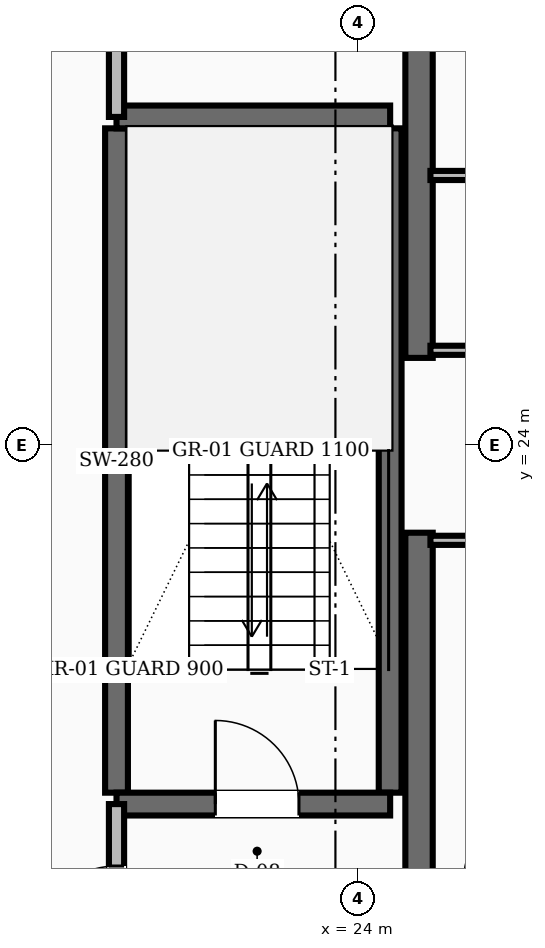
"""IFC4 building model, lengths in metres.
Left out: names, types, materials, properties, quantities, classifications, styles, units other than length and angle.
Written with IfcOpenShell. Run it as: python <this file> out.ifc"""

import sys

from ifc_helpers import new_model, si_unit, direction, frame, frame_2d, origin, place, context, subcontext, project, spatial, rectangle, extrude, element, fill, save


model = new_model("IFC4")
c1 = context("Model", 3, precision=1e-05, world=origin(), true_north=direction((0.0, 1.0)))
c2 = subcontext(c1, "Body", "Model", "MODEL_VIEW")
j1 = project(units=[si_unit("LENGTHUNIT", "METRE"), si_unit("PLANEANGLEUNIT", "RADIAN")], contexts=[c1])
p1 = place(None, origin())
s1 = spatial("IfcSite", under=j1, at=p1, CompositionType="ELEMENT")
p2 = place(p1, origin())
s2 = spatial("IfcBuilding", under=s1, at=p2, CompositionType="ELEMENT")
p3 = place(p2, frame((0.0, 0.0, 149.6)))
s3 = spatial("IfcBuildingStorey", under=s2, at=p3, CompositionType="ELEMENT", Elevation=149.6)
for number, where, z_axis, x_axis in (
    (1, (24.8, 16.55, 0.0), (0.0, 0.0, 1.0), (0.0, 1.0, 0.0)),
    (2, (24.8, 25.15, 0.0), (0.0, 0.0, 1.0), (0.0, 1.0, 0.0)),
):
    element("IfcWall", number, at=place(p3, frame(where, z_axis=z_axis, x_axis=x_axis)), inside=s3, PredefinedType="SHEAR", context=c2, shape_type="SweptSolid", body=[
        extrude(rectangle(XDim=6.3, YDim=0.36, at=frame_2d((3.15, 0.0))), origin(), (0.0, 0.0, 1.0), 3.6),
    ])
for number, where, z_axis, x_axis in (
    (3, (20.82, 19.43, 0.0), (0.0, 0.0, 1.0), (0.0, 1.0, 0.0)),
    (4, (24.42, 19.43, 0.0), (0.0, 0.0, 1.0), (0.0, 1.0, 0.0)),
):
    element("IfcWall", number, at=place(p3, frame(where, z_axis=z_axis, x_axis=x_axis)), inside=s3, PredefinedType="SHEAR", context=c2, shape_type="SweptSolid", body=[
        extrude(rectangle(XDim=8.74, YDim=0.3, at=frame_2d((4.37, 0.0))), origin(), (0.0, 0.0, 1.0), 3.6),
    ])
p4 = place(p3, frame((20.82, 19.28, 0.0), z_axis=(0.0, 0.0, 1.0), x_axis=(1.0, 0.0, 0.0)))
e5 = element("IfcWall", 5, at=p4, inside=s3, PredefinedType="SHEAR", context=c2, shape_type="SweptSolid", body=[
    extrude(rectangle(XDim=3.6, YDim=0.3, at=frame_2d((1.8, 0.0))), origin(), (0.0, 0.0, 1.0), 3.6),
])
p5 = place(p4, frame((1.3, 0.0, 0.0)))
e6 = element("IfcOpeningElement", 6, at=p5, cuts=e5, PredefinedType="OPENING", context=c2, shape_type="SweptSolid", body=[
    extrude(rectangle(XDim=1.1, YDim=2.1, at=frame_2d((0.55, 1.05))), frame((0.0, 0.16, 0.0), z_axis=(0.0, -1.0, 0.0), x_axis=(1.0, 0.0, 0.0)), (0.0, 0.0, 1.0), 0.32),
])
p6 = place(p3, frame((20.82, 28.32, 0.0), z_axis=(0.0, 0.0, 1.0), x_axis=(1.0, 0.0, 0.0)))
e7 = element("IfcWall", 7, at=p6, inside=s3, PredefinedType="SHEAR", context=c2, shape_type="SweptSolid", body=[
    extrude(rectangle(XDim=3.6, YDim=0.3, at=frame_2d((1.8, 0.0))), origin(), (0.0, 0.0, 1.0), 3.6),
])
p7 = place(p3, frame((20.82, 16.55, 0.0), z_axis=(0.0, 0.0, 1.0), x_axis=(0.0, 1.0, 0.0)))
e8 = element("IfcWall", 8, at=p7, inside=s3, PredefinedType="SOLIDWALL", context=c2, shape_type="SweptSolid", body=[
    extrude(rectangle(XDim=2.73, YDim=0.2, at=frame_2d((1.365, 0.0))), origin(), (0.0, 0.0, 1.0), 2.8),
])
p8 = place(p7, frame((0.815, 0.0, 0.0)))
e9 = element("IfcOpeningElement", 9, at=p8, cuts=e8, PredefinedType="OPENING", context=c2, shape_type="SweptSolid", body=[
    extrude(rectangle(XDim=1.1, YDim=2.1, at=frame_2d((0.55, 1.05))), frame((0.0, 0.11, 0.0), z_axis=(0.0, -1.0, 0.0), x_axis=(1.0, 0.0, 0.0)), (0.0, 0.0, 1.0), 0.22),
])
p9 = place(p3, frame((20.82, 28.32, 0.0), z_axis=(0.0, 0.0, 1.0), x_axis=(0.0, 1.0, 0.0)))
e10 = element("IfcWall", 10, at=p9, inside=s3, PredefinedType="SOLIDWALL", context=c2, shape_type="SweptSolid", body=[
    extrude(rectangle(XDim=3.13, YDim=0.2, at=frame_2d((1.565, 0.0))), origin(), (0.0, 0.0, 1.0), 2.8),
])
p10 = place(p9, frame((1.09, 0.0, 0.0)))
e11 = element("IfcOpeningElement", 11, at=p10, cuts=e10, PredefinedType="OPENING", context=c2, shape_type="SweptSolid", body=[
    extrude(rectangle(XDim=0.95, YDim=2.1, at=frame_2d((0.475, 1.05))), frame((0.0, 0.11, 0.0), z_axis=(0.0, -1.0, 0.0), x_axis=(1.0, 0.0, 0.0)), (0.0, 0.0, 1.0), 0.22),
])
p11 = place(p3, frame((24.95, 25.25, 0.0), z_axis=(0.0, 0.0, 1.0), x_axis=(1.0, 0.0, 0.0)))
e12 = element("IfcWall", 12, at=p11, inside=s3, PredefinedType="PARTITIONING", context=c2, shape_type="SweptSolid", body=[
    extrude(rectangle(XDim=3.2, YDim=0.12, at=frame_2d((1.6, 0.0))), origin(), (0.0, 0.0, 1.0), 2.8),
])
p12 = place(p11, frame((1.125, 0.0, 0.0)))
e13 = element("IfcOpeningElement", 13, at=p12, cuts=e12, PredefinedType="OPENING", context=c2, shape_type="SweptSolid", body=[
    extrude(rectangle(XDim=0.95, YDim=2.1, at=frame_2d((0.475, 1.05))), frame((0.0, 0.07, 0.0), z_axis=(0.0, -1.0, 0.0), x_axis=(1.0, 0.0, 0.0)), (0.0, 0.0, 1.0), 0.14),
])
p13 = place(p3, frame((24.95, 22.75, 0.0), z_axis=(0.0, 0.0, 1.0), x_axis=(1.0, 0.0, 0.0)))
e14 = element("IfcWall", 14, at=p13, inside=s3, PredefinedType="PARTITIONING", context=c2, shape_type="SweptSolid", body=[
    extrude(rectangle(XDim=3.2, YDim=0.12, at=frame_2d((1.6, 0.0))), origin(), (0.0, 0.0, 1.0), 2.8),
])
p14 = place(p13, frame((1.125, 0.0, 0.0)))
e15 = element("IfcOpeningElement", 15, at=p14, cuts=e14, PredefinedType="OPENING", context=c2, shape_type="SweptSolid", body=[
    extrude(rectangle(XDim=0.95, YDim=2.1, at=frame_2d((0.475, 1.05))), frame((0.0, 0.07, 0.0), z_axis=(0.0, -1.0, 0.0), x_axis=(1.0, 0.0, 0.0)), (0.0, 0.0, 1.0), 0.14),
])
p15 = place(p3, frame((24.95, 27.55, 0.0), z_axis=(0.0, 0.0, 1.0), x_axis=(1.0, 0.0, 0.0)))
e16 = element("IfcWall", 16, at=p15, inside=s3, PredefinedType="PARTITIONING", context=c2, shape_type="SweptSolid", body=[
    extrude(rectangle(XDim=3.2, YDim=0.12, at=frame_2d((1.6, 0.0))), origin(), (0.0, 0.0, 1.0), 2.8),
])
p16 = place(p15, frame((1.125, 0.0, 0.0)))
e17 = element("IfcOpeningElement", 17, at=p16, cuts=e16, PredefinedType="OPENING", context=c2, shape_type="SweptSolid", body=[
    extrude(rectangle(XDim=0.95, YDim=2.1, at=frame_2d((0.475, 1.05))), frame((0.0, 0.07, 0.0), z_axis=(0.0, -1.0, 0.0), x_axis=(1.0, 0.0, 0.0)), (0.0, 0.0, 1.0), 0.14),
])
p17 = place(p5, origin())
e18 = element("IfcDoor", 18, at=p17, inside=s3, OperationType="SINGLE_SWING_LEFT", PredefinedType="DOOR", context=c2, shape_type="SweptSolid", body=[
    extrude(rectangle(XDim=1.1, YDim=2.1, at=frame_2d((0.55, 1.05))), frame((0.0, 0.025, 0.0), z_axis=(0.0, -1.0, 0.0), x_axis=(1.0, 0.0, 0.0)), (0.0, 0.0, 1.0), 0.05),
])
fill(e6, e18)
p18 = place(p8, origin())
e19 = element("IfcDoor", 19, at=p18, inside=s3, OperationType="SINGLE_SWING_LEFT", PredefinedType="DOOR", context=c2, shape_type="SweptSolid", body=[
    extrude(rectangle(XDim=1.1, YDim=2.1, at=frame_2d((0.55, 1.05))), frame((0.0, 0.025, 0.0), z_axis=(0.0, -1.0, 0.0), x_axis=(1.0, 0.0, 0.0)), (0.0, 0.0, 1.0), 0.05),
])
fill(e9, e19)
save(model, sys.argv[1])
